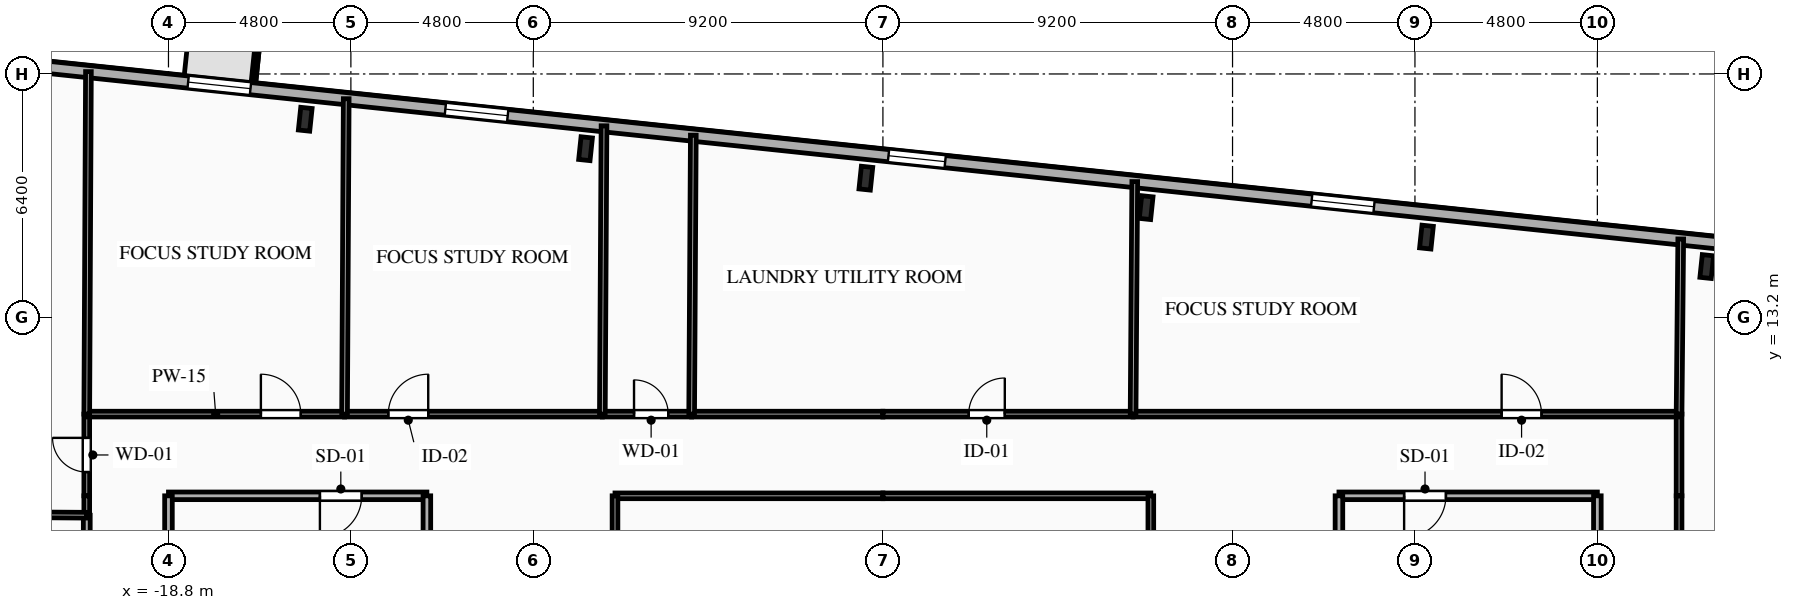
"""IFC4 building model, lengths in metres.
Left out: names, types, materials, properties, quantities, classifications, styles, units other than length and angle.
Written with IfcOpenShell. Run it as: python <this file> out.ifc"""

import sys

from ifc_helpers import new_model, si_unit, direction, frame, frame_2d, origin, origin_2d, place, context, subcontext, project, spatial, rectangle, i_section, extrude, element, fill, save


model = new_model("IFC4")
c1 = context("Model", 3, precision=1e-05, world=origin(), true_north=direction((0.0, 1.0)))
c2 = subcontext(c1, "Body", "Model", "MODEL_VIEW")
j1 = project(units=[si_unit("LENGTHUNIT", "METRE"), si_unit("PLANEANGLEUNIT", "RADIAN")], contexts=[c1])
p1 = place(None, origin())
s1 = spatial("IfcSite", under=j1, at=p1, CompositionType="ELEMENT")
p2 = place(p1, origin())
s2 = spatial("IfcBuilding", under=s1, at=p2, CompositionType="ELEMENT")
p3 = place(p2, frame((0.0, 0.0, 213.15)))
s3 = spatial("IfcBuildingStorey", under=s2, at=p3, CompositionType="ELEMENT", Elevation=213.15)
for number, where, z_axis, x_axis in (
    (1, (21.679, 14.532, 0.0), (0.0, 0.0, 1.0), (0.995, -0.105, 0.0)),
    (2, (14.303, 15.308, 0.0), (0.0, 0.0, 1.0), (0.995, -0.105, 0.0)),
    (3, (6.927, 16.083, 0.0), (0.0, 0.0, 1.0), (0.995, -0.105, 0.0)),
    (4, (-0.449, 16.858, 0.0), (0.0, 0.0, 1.0), (0.995, -0.105, 0.0)),
    (5, (-7.825, 17.634, 0.0), (0.0, 0.0, 1.0), (0.995, -0.105, 0.0)),
    (6, (-15.201, 18.409, 0.0), (0.0, 0.0, 1.0), (0.995, -0.105, 0.0)),
):
    element("IfcColumn", number, at=place(p3, frame(where, z_axis=z_axis, x_axis=x_axis)), inside=s3, PredefinedType="COLUMN", context=c2, shape_type="SweptSolid", body=[
        extrude(i_section(OverallWidth=0.3, OverallDepth=0.6, WebThickness=0.015, FlangeThickness=0.03, FilletRadius=0.027, at=origin_2d()), origin(), (0.0, 0.0, 1.0), 3.35),
    ])
p4 = place(p3, frame((-23.156, 19.898, 0.0), z_axis=(0.0, 0.0, 1.0), x_axis=(0.994522001802, -0.104527450613, 0.0)))
e7 = element("IfcWall", 7, at=p4, inside=s3, PredefinedType="SOLIDWALL", context=c2, shape_type="SweptSolid", body=[
    extrude(rectangle(XDim=45.8, YDim=0.32, at=frame_2d((22.9, 0.0))), origin(), (0.0, 0.0, 1.0), 3.04),
])
p5 = place(p4, frame((4.9, 0.0, 0.85)))
e8 = element("IfcOpeningElement", 8, at=p5, cuts=e7, PredefinedType="OPENING", context=c2, shape_type="SweptSolid", body=[
    extrude(rectangle(XDim=1.65, YDim=1.85, at=frame_2d((0.825, 0.925))), frame((0.0, 0.17, 0.0), z_axis=(0.0, -1.0, 0.0), x_axis=(1.0, 0.0, 0.0)), (0.0, 0.0, 1.0), 0.34),
])
p6 = place(p4, frame((11.706, 0.0, 0.85)))
e9 = element("IfcOpeningElement", 9, at=p6, cuts=e7, PredefinedType="OPENING", context=c2, shape_type="SweptSolid", body=[
    extrude(rectangle(XDim=1.65, YDim=1.85, at=frame_2d((0.825, 0.925))), frame((0.0, 0.17, 0.0), z_axis=(0.0, -1.0, 0.0), x_axis=(1.0, 0.0, 0.0)), (0.0, 0.0, 1.0), 0.34),
])
p7 = place(p4, frame((23.431, 0.0, 0.85)))
e10 = element("IfcOpeningElement", 10, at=p7, cuts=e7, PredefinedType="OPENING", context=c2, shape_type="SweptSolid", body=[
    extrude(rectangle(XDim=1.5, YDim=1.85, at=frame_2d((0.75, 0.925))), frame((0.0, 0.17, 0.0), z_axis=(0.0, -1.0, 0.0), x_axis=(1.0, 0.0, 0.0)), (0.0, 0.0, 1.0), 0.34),
])
p8 = place(p4, frame((34.628, 0.0, 0.85)))
e11 = element("IfcOpeningElement", 11, at=p8, cuts=e7, PredefinedType="OPENING", context=c2, shape_type="SweptSolid", body=[
    extrude(rectangle(XDim=1.65, YDim=1.85, at=frame_2d((0.825, 0.925))), frame((0.0, 0.17, 0.0), z_axis=(0.0, -1.0, 0.0), x_axis=(1.0, 0.0, 0.0)), (0.0, 0.0, 1.0), 0.34),
])
p9 = place(p3, frame((-12.0, 8.5, 0.0), z_axis=(0.0, 0.0, 1.0), x_axis=(-1.0, 0.0, 0.0)))
e12 = element("IfcWall", 12, at=p9, inside=s3, PredefinedType="PARTITIONING", context=c2, shape_type="SweptSolid", body=[
    extrude(rectangle(XDim=6.8, YDim=0.2, at=frame_2d((3.4, 0.0))), origin(), (0.0, 0.0, 1.0), 3.04),
])
p10 = place(p9, frame((1.715, 0.0, 0.0)))
e13 = element("IfcOpeningElement", 13, at=p10, cuts=e12, PredefinedType="OPENING", context=c2, shape_type="SweptSolid", body=[
    extrude(rectangle(XDim=1.1, YDim=2.15, at=frame_2d((0.55, 1.075))), frame((0.0, 0.11, 0.0), z_axis=(0.0, -1.0, 0.0), x_axis=(1.0, 0.0, 0.0)), (0.0, 0.0, 1.0), 0.22),
])
p11 = place(p3, frame((-18.8, 8.5, 0.0), z_axis=(0.0, 0.0, 1.0), x_axis=(0.0, -1.0, 0.0)))
e14 = element("IfcWall", 14, at=p11, inside=s3, PredefinedType="PARTITIONING", context=c2, shape_type="SweptSolid", body=[
    extrude(rectangle(XDim=2.9, YDim=0.2, at=frame_2d((1.45, 0.0))), origin(), (0.0, 0.0, 1.0), 2.665),
])
p12 = place(p3, frame((-12.0, 5.6, 0.0), z_axis=(0.0, 0.0, 1.0), x_axis=(0.0, 1.0, 0.0)))
e15 = element("IfcWall", 15, at=p12, inside=s3, PredefinedType="PARTITIONING", context=c2, shape_type="SweptSolid", body=[
    extrude(rectangle(XDim=2.9, YDim=0.2, at=frame_2d((1.45, 0.0))), origin(), (0.0, 0.0, 1.0), 3.04),
])
p13 = place(p3, frame((18.8, 8.5, 0.0), z_axis=(0.0, 0.0, 1.0), x_axis=(-1.0, 0.0, 0.0)))
e16 = element("IfcWall", 16, at=p13, inside=s3, PredefinedType="PARTITIONING", context=c2, shape_type="SweptSolid", body=[
    extrude(rectangle(XDim=6.8, YDim=0.2, at=frame_2d((3.4, 0.0))), origin(), (0.0, 0.0, 1.0), 3.04),
])
p14 = place(p13, frame((3.985, 0.0, 0.0)))
e17 = element("IfcOpeningElement", 17, at=p14, cuts=e16, PredefinedType="OPENING", context=c2, shape_type="SweptSolid", body=[
    extrude(rectangle(XDim=1.1, YDim=2.15, at=frame_2d((0.55, 1.075))), frame((0.0, 0.11, 0.0), z_axis=(0.0, -1.0, 0.0), x_axis=(1.0, 0.0, 0.0)), (0.0, 0.0, 1.0), 0.22),
])
p15 = place(p3, frame((18.8, 5.6, 0.0), z_axis=(0.0, 0.0, 1.0), x_axis=(0.0, 1.0, 0.0)))
e18 = element("IfcWall", 18, at=p15, inside=s3, PredefinedType="PARTITIONING", context=c2, shape_type="SweptSolid", body=[
    extrude(rectangle(XDim=2.9, YDim=0.2, at=frame_2d((1.45, 0.0))), origin(), (0.0, 0.0, 1.0), 2.665),
])
p16 = place(p3, frame((12.0, 8.5, 0.0), z_axis=(0.0, 0.0, 1.0), x_axis=(0.0, -1.0, 0.0)))
e19 = element("IfcWall", 19, at=p16, inside=s3, PredefinedType="PARTITIONING", context=c2, shape_type="SweptSolid", body=[
    extrude(rectangle(XDim=2.9, YDim=0.2, at=frame_2d((1.45, 0.0))), origin(), (0.0, 0.0, 1.0), 3.04),
])
p17 = place(p3, frame((-20.95, 8.5, 0.0), z_axis=(0.0, 0.0, 1.0), x_axis=(0.0, 1.0, 0.0)))
e20 = element("IfcWall", 20, at=p17, inside=s3, PredefinedType="PARTITIONING", context=c2, shape_type="SweptSolid", body=[
    extrude(rectangle(XDim=2.15, YDim=0.15, at=frame_2d((1.075, 0.0))), origin(), (0.0, 0.0, 1.0), 3.04),
])
p18 = place(p17, frame((0.625, 0.0, 0.0)))
e21 = element("IfcOpeningElement", 21, at=p18, cuts=e20, PredefinedType="OPENING", context=c2, shape_type="SweptSolid", body=[
    extrude(rectangle(XDim=0.9, YDim=2.1, at=frame_2d((0.45, 1.05))), frame((0.0, 0.085, 0.0), z_axis=(0.0, -1.0, 0.0), x_axis=(1.0, 0.0, 0.0)), (0.0, 0.0, 1.0), 0.17),
])
p19 = place(p3, frame((-20.95, 10.65, 0.0), z_axis=(0.0, 0.0, 1.0), x_axis=(1.0, 0.0, 0.0)))
e22 = element("IfcWall", 22, at=p19, inside=s3, PredefinedType="PARTITIONING", context=c2, shape_type="SweptSolid", body=[
    extrude(rectangle(XDim=6.783, YDim=0.15, at=frame_2d((3.392, 0.0))), origin(), (0.0, 0.0, 1.0), 3.04),
])
p20 = place(p19, frame((4.582, 0.0, 0.0)))
e23 = element("IfcOpeningElement", 23, at=p20, cuts=e22, PredefinedType="OPENING", context=c2, shape_type="SweptSolid", body=[
    extrude(rectangle(XDim=1.05, YDim=2.15, at=frame_2d((0.525, 1.075))), frame((0.0, 0.085, 0.0), z_axis=(0.0, -1.0, 0.0), x_axis=(1.0, 0.0, 0.0)), (0.0, 0.0, 1.0), 0.17),
])
p21 = place(p3, frame((-14.167, 10.65, 0.0), z_axis=(0.0, 0.0, 1.0), x_axis=(1.0, 0.0, 0.0)))
e24 = element("IfcWall", 24, at=p21, inside=s3, PredefinedType="PARTITIONING", context=c2, shape_type="SweptSolid", body=[
    extrude(rectangle(XDim=6.783, YDim=0.15, at=frame_2d((3.392, 0.0))), origin(), (0.0, 0.0, 1.0), 3.04),
])
p22 = place(p21, frame((1.152, 0.0, 0.0)))
e25 = element("IfcOpeningElement", 25, at=p22, cuts=e24, PredefinedType="OPENING", context=c2, shape_type="SweptSolid", body=[
    extrude(rectangle(XDim=1.05, YDim=2.15, at=frame_2d((0.525, 1.075))), frame((0.0, 0.085, 0.0), z_axis=(0.0, -1.0, 0.0), x_axis=(1.0, 0.0, 0.0)), (0.0, 0.0, 1.0), 0.17),
])
p23 = place(p3, frame((-7.383, 10.65, 0.0), z_axis=(0.0, 0.0, 1.0), x_axis=(1.0, 0.0, 0.0)))
e26 = element("IfcWall", 26, at=p23, inside=s3, PredefinedType="PLUMBINGWALL", context=c2, shape_type="SweptSolid", body=[
    extrude(rectangle(XDim=2.35, YDim=0.15, at=frame_2d((1.175, 0.0))), origin(), (0.0, 0.0, 1.0), 3.04),
])
p24 = place(p23, frame((0.834, 0.0, 0.0)))
e27 = element("IfcOpeningElement", 27, at=p24, cuts=e26, PredefinedType="OPENING", context=c2, shape_type="SweptSolid", body=[
    extrude(rectangle(XDim=0.9, YDim=2.1, at=frame_2d((0.45, 1.05))), frame((0.0, 0.085, 0.0), z_axis=(0.0, -1.0, 0.0), x_axis=(1.0, 0.0, 0.0)), (0.0, 0.0, 1.0), 0.17),
])
p25 = place(p3, frame((-5.033, 10.65, 0.0), z_axis=(0.0, 0.0, 1.0), x_axis=(1.0, 0.0, 0.0)))
e28 = element("IfcWall", 28, at=p25, inside=s3, PredefinedType="PARTITIONING", context=c2, shape_type="SweptSolid", body=[
    extrude(rectangle(XDim=5.033, YDim=0.15, at=frame_2d((2.517, 0.0))), origin(), (0.0, 0.0, 1.0), 3.04),
])
p26 = place(p3, frame((0.0, 8.5, 0.0), z_axis=(0.0, 0.0, 1.0), x_axis=(-1.0, 0.0, 0.0)))
e29 = element("IfcWall", 29, at=p26, inside=s3, PredefinedType="PARTITIONING", context=c2, shape_type="SweptSolid", body=[
    extrude(rectangle(XDim=7.05, YDim=0.15, at=frame_2d((3.525, 0.0))), origin(), (0.0, 0.0, 1.0), 3.04),
])
p27 = place(p3, frame((20.95, 10.65, 0.0), z_axis=(0.0, 0.0, 1.0), x_axis=(0.0, -1.0, 0.0)))
e30 = element("IfcWall", 30, at=p27, inside=s3, PredefinedType="PARTITIONING", context=c2, shape_type="SweptSolid", body=[
    extrude(rectangle(XDim=2.15, YDim=0.15, at=frame_2d((1.075, 0.0))), origin(), (0.0, 0.0, 1.0), 3.04),
])
p28 = place(p3, frame((0.0, 10.65, 0.0), z_axis=(0.0, 0.0, 1.0), x_axis=(1.0, 0.0, 0.0)))
e31 = element("IfcWall", 31, at=p28, inside=s3, PredefinedType="PARTITIONING", context=c2, shape_type="SweptSolid", body=[
    extrude(rectangle(XDim=6.583, YDim=0.15, at=frame_2d((3.292, 0.0))), origin(), (0.0, 0.0, 1.0), 3.04),
])
p29 = place(p28, frame((2.257, 0.0, 0.0)))
e32 = element("IfcOpeningElement", 32, at=p29, cuts=e31, PredefinedType="OPENING", context=c2, shape_type="SweptSolid", body=[
    extrude(rectangle(XDim=0.95, YDim=2.1, at=frame_2d((0.475, 1.05))), frame((0.0, 0.085, 0.0), z_axis=(0.0, -1.0, 0.0), x_axis=(1.0, 0.0, 0.0)), (0.0, 0.0, 1.0), 0.17),
])
p30 = place(p3, frame((6.583, 10.65, 0.0), z_axis=(0.0, 0.0, 1.0), x_axis=(1.0, 0.0, 0.0)))
e33 = element("IfcWall", 33, at=p30, inside=s3, PredefinedType="PARTITIONING", context=c2, shape_type="SweptSolid", body=[
    extrude(rectangle(XDim=14.367, YDim=0.15, at=frame_2d((7.184, 0.0))), origin(), (0.0, 0.0, 1.0), 3.04),
])
p31 = place(p30, frame((9.698, 0.0, 0.0)))
e34 = element("IfcOpeningElement", 34, at=p31, cuts=e33, PredefinedType="OPENING", context=c2, shape_type="SweptSolid", body=[
    extrude(rectangle(XDim=1.05, YDim=2.15, at=frame_2d((0.525, 1.075))), frame((0.0, 0.085, 0.0), z_axis=(0.0, -1.0, 0.0), x_axis=(1.0, 0.0, 0.0)), (0.0, 0.0, 1.0), 0.17),
])
p32 = place(p3, frame((7.05, 8.5, 0.0), z_axis=(0.0, 0.0, 1.0), x_axis=(-1.0, 0.0, 0.0)))
e35 = element("IfcWall", 35, at=p32, inside=s3, PredefinedType="PARTITIONING", context=c2, shape_type="SweptSolid", body=[
    extrude(rectangle(XDim=7.05, YDim=0.15, at=frame_2d((3.525, 0.0))), origin(), (0.0, 0.0, 1.0), 3.04),
])
p33 = place(p3, frame((-20.95, -1.306, 0.0), z_axis=(0.0, 0.0, 1.0), x_axis=(0.0, 1.0, 0.0)))
e36 = element("IfcWall", 36, at=p33, inside=s3, PredefinedType="PARTITIONING", context=c2, shape_type="SweptSolid", body=[
    extrude(rectangle(XDim=9.296, YDim=0.18, at=frame_2d((4.648, 0.0))), origin(), (0.0, 0.0, 1.0), 3.04),
])
p34 = place(p33, frame((1.472, 0.0, 0.0)))
e37 = element("IfcOpeningElement", 37, at=p34, cuts=e36, PredefinedType="OPENING", context=c2, shape_type="SweptSolid", body=[
    extrude(rectangle(XDim=1.0, YDim=2.15, at=frame_2d((0.5, 1.075))), frame((0.0, 0.1, 0.0), z_axis=(0.0, -1.0, 0.0), x_axis=(1.0, 0.0, 0.0)), (0.0, 0.0, 1.0), 0.2),
])
p35 = place(p3, frame((-20.95, 7.99, 0.0), z_axis=(0.0, 0.0, 1.0), x_axis=(0.0, 1.0, 0.0)))
e38 = element("IfcWall", 38, at=p35, inside=s3, PredefinedType="PARTITIONING", context=c2, shape_type="SweptSolid", body=[
    extrude(rectangle(XDim=0.51, YDim=0.15, at=frame_2d((0.255, 0.0))), origin(), (0.0, 0.0, 1.0), 3.04),
])
p36 = place(p3, frame((20.95, 8.5, 0.0), z_axis=(0.0, 0.0, 1.0), x_axis=(0.0, -1.0, 0.0)))
e39 = element("IfcWall", 39, at=p36, inside=s3, PredefinedType="PARTITIONING", context=c2, shape_type="SweptSolid", body=[
    extrude(rectangle(XDim=9.263, YDim=0.15, at=frame_2d((4.632, 0.0))), origin(), (0.0, 0.0, 1.0), 2.695),
])
p37 = place(p36, frame((6.751, 0.0, 0.0)))
e40 = element("IfcOpeningElement", 40, at=p37, cuts=e39, PredefinedType="OPENING", context=c2, shape_type="SweptSolid", body=[
    extrude(rectangle(XDim=1.05, YDim=2.15, at=frame_2d((0.525, 1.075))), frame((0.0, 0.085, 0.0), z_axis=(0.0, -1.0, 0.0), x_axis=(1.0, 0.0, 0.0)), (0.0, 0.0, 1.0), 0.17),
])
for number, where, z_axis, x_axis in (
    (41, (-7.05, 8.5, 0.0), (0.0, 0.0, 1.0), (0.0, -1.0, 0.0)),
    (42, (7.05, -0.8, 0.0), (0.0, 0.0, 1.0), (0.0, 1.0, 0.0)),
):
    element("IfcWall", number, at=place(p3, frame(where, z_axis=z_axis, x_axis=x_axis)), inside=s3, PredefinedType="PARTITIONING", context=c2, shape_type="SweptSolid", body=[
        extrude(rectangle(XDim=9.3, YDim=0.15, at=frame_2d((4.65, 0.0))), origin(), (0.0, 0.0, 1.0), 3.04),
    ])
p38 = place(p3, frame((-27.419, 8.034, 0.0), z_axis=(0.0, 0.0, 1.0), x_axis=(0.999976928608, -0.006792808784, 0.0)))
e43 = element("IfcWall", 43, at=p38, inside=s3, PredefinedType="PARTITIONING", context=c2, shape_type="SweptSolid", body=[
    extrude(rectangle(XDim=6.469, YDim=0.15, at=frame_2d((3.235, 0.0))), origin(), (0.0, 0.0, 1.0), 3.04),
])
p39 = place(p3, frame((-20.906, 19.662, 0.0), z_axis=(0.0, 0.0, 1.0), x_axis=(-0.004876272857, -0.999988110911, 0.0)))
e44 = element("IfcWall", 44, at=p39, inside=s3, PredefinedType="PARTITIONING", context=c2, shape_type="SweptSolid", body=[
    extrude(rectangle(XDim=9.012, YDim=0.15, at=frame_2d((4.506, 0.0))), origin(), (0.0, 0.0, 1.0), 2.665),
])
p40 = place(p3, frame((20.95, 10.65, 0.0), z_axis=(0.0, 0.0, 1.0), x_axis=(0.009535990233, 0.999954531411, 0.0)))
e45 = element("IfcWall", 45, at=p40, inside=s3, PredefinedType="PARTITIONING", context=c2, shape_type="SweptSolid", body=[
    extrude(rectangle(XDim=4.608, YDim=0.15, at=frame_2d((2.304, 0.0))), origin(), (0.0, 0.0, 1.0), 2.665),
])
p41 = place(p3, frame((-14.123, 18.949, 0.0), z_axis=(0.0, 0.0, 1.0), x_axis=(-0.005295133602, -0.999985980682, 0.0)))
e46 = element("IfcWall", 46, at=p41, inside=s3, PredefinedType="PARTITIONING", context=c2, shape_type="SweptSolid", body=[
    extrude(rectangle(XDim=8.299, YDim=0.15, at=frame_2d((4.149, 0.0))), origin(), (0.0, 0.0, 1.0), 3.04),
])
p42 = place(p3, frame((-7.339, 18.236, 0.0), z_axis=(0.0, 0.0, 1.0), x_axis=(-0.005792713287, -0.999983222096, 0.0)))
e47 = element("IfcWall", 47, at=p42, inside=s3, PredefinedType="PLUMBINGWALL", context=c2, shape_type="SweptSolid", body=[
    extrude(rectangle(XDim=7.586, YDim=0.15, at=frame_2d((3.793, 0.0))), origin(), (0.0, 0.0, 1.0), 3.04),
])
p43 = place(p3, frame((-4.989, 17.989, 0.0), z_axis=(0.0, 0.0, 1.0), x_axis=(-0.005987717415, -0.999982073459, 0.0)))
e48 = element("IfcWall", 48, at=p43, inside=s3, PredefinedType="PLUMBINGWALL", context=c2, shape_type="SweptSolid", body=[
    extrude(rectangle(XDim=7.339, YDim=0.15, at=frame_2d((3.67, 0.0))), origin(), (0.0, 0.0, 1.0), 3.04),
])
p44 = place(p3, frame((6.627, 16.768, 0.0), z_axis=(0.0, 0.0, 1.0), x_axis=(-0.007182576093, -0.999974204968, 0.0)))
e49 = element("IfcWall", 49, at=p44, inside=s3, PredefinedType="PARTITIONING", context=c2, shape_type="SweptSolid", body=[
    extrude(rectangle(XDim=6.118, YDim=0.15, at=frame_2d((3.059, 0.0))), origin(), (0.0, 0.0, 1.0), 3.04),
])
p45 = place(p5, origin())
e50 = element("IfcWindow", 50, at=p45, inside=s3, PartitioningType="SINGLE_PANEL", PredefinedType="WINDOW", context=c2, shape_type="SweptSolid", body=[
    extrude(rectangle(XDim=1.65, YDim=1.85, at=frame_2d((0.825, 0.925))), frame((0.0, 0.03, 0.0), z_axis=(0.0, -1.0, 0.0), x_axis=(1.0, 0.0, 0.0)), (0.0, 0.0, 1.0), 0.06),
])
fill(e8, e50)
p46 = place(p6, origin())
e51 = element("IfcWindow", 51, at=p46, inside=s3, PartitioningType="SINGLE_PANEL", PredefinedType="WINDOW", context=c2, shape_type="SweptSolid", body=[
    extrude(rectangle(XDim=1.65, YDim=1.85, at=frame_2d((0.825, 0.925))), frame((0.0, 0.03, 0.0), z_axis=(0.0, -1.0, 0.0), x_axis=(1.0, 0.0, 0.0)), (0.0, 0.0, 1.0), 0.06),
])
fill(e9, e51)
p47 = place(p7, origin())
e52 = element("IfcWindow", 52, at=p47, inside=s3, PartitioningType="SINGLE_PANEL", PredefinedType="WINDOW", context=c2, shape_type="SweptSolid", body=[
    extrude(rectangle(XDim=1.5, YDim=1.85, at=frame_2d((0.75, 0.925))), frame((0.0, 0.03, 0.0), z_axis=(0.0, -1.0, 0.0), x_axis=(1.0, 0.0, 0.0)), (0.0, 0.0, 1.0), 0.06),
])
fill(e10, e52)
p48 = place(p8, origin())
e53 = element("IfcWindow", 53, at=p48, inside=s3, PartitioningType="SINGLE_PANEL", PredefinedType="WINDOW", context=c2, shape_type="SweptSolid", body=[
    extrude(rectangle(XDim=1.65, YDim=1.85, at=frame_2d((0.825, 0.925))), frame((0.0, 0.03, 0.0), z_axis=(0.0, -1.0, 0.0), x_axis=(1.0, 0.0, 0.0)), (0.0, 0.0, 1.0), 0.06),
])
fill(e11, e53)
p49 = place(p10, origin())
e54 = element("IfcDoor", 54, at=p49, inside=s3, OperationType="SINGLE_SWING_RIGHT", PredefinedType="DOOR", context=c2, shape_type="SweptSolid", body=[
    extrude(rectangle(XDim=1.1, YDim=2.15, at=frame_2d((0.55, 1.075))), frame((0.0, 0.025, 0.0), z_axis=(0.0, -1.0, 0.0), x_axis=(1.0, 0.0, 0.0)), (0.0, 0.0, 1.0), 0.05),
])
fill(e13, e54)
p50 = place(p14, origin())
e55 = element("IfcDoor", 55, at=p50, inside=s3, OperationType="SINGLE_SWING_RIGHT", PredefinedType="DOOR", context=c2, shape_type="SweptSolid", body=[
    extrude(rectangle(XDim=1.1, YDim=2.15, at=frame_2d((0.55, 1.075))), frame((0.0, 0.025, 0.0), z_axis=(0.0, -1.0, 0.0), x_axis=(1.0, 0.0, 0.0)), (0.0, 0.0, 1.0), 0.05),
])
fill(e17, e55)
p51 = place(p18, origin())
e56 = element("IfcDoor", 56, at=p51, inside=s3, OperationType="SINGLE_SWING_RIGHT", PredefinedType="DOOR", context=c2, shape_type="SweptSolid", body=[
    extrude(rectangle(XDim=0.9, YDim=2.1, at=frame_2d((0.45, 1.05))), frame((0.0, 0.025, 0.0), z_axis=(0.0, -1.0, 0.0), x_axis=(1.0, 0.0, 0.0)), (0.0, 0.0, 1.0), 0.05),
])
fill(e21, e56)
p52 = place(p20, origin())
e57 = element("IfcDoor", 57, at=p52, inside=s3, OperationType="SINGLE_SWING_LEFT", PredefinedType="DOOR", context=c2, shape_type="SweptSolid", body=[
    extrude(rectangle(XDim=1.05, YDim=2.15, at=frame_2d((0.525, 1.075))), frame((0.0, 0.025, 0.0), z_axis=(0.0, -1.0, 0.0), x_axis=(1.0, 0.0, 0.0)), (0.0, 0.0, 1.0), 0.05),
])
fill(e23, e57)
p53 = place(p22, origin())
e58 = element("IfcDoor", 58, at=p53, inside=s3, OperationType="SINGLE_SWING_RIGHT", PredefinedType="DOOR", context=c2, shape_type="SweptSolid", body=[
    extrude(rectangle(XDim=1.05, YDim=2.15, at=frame_2d((0.525, 1.075))), frame((0.0, 0.025, 0.0), z_axis=(0.0, -1.0, 0.0), x_axis=(1.0, 0.0, 0.0)), (0.0, 0.0, 1.0), 0.05),
])
fill(e25, e58)
p54 = place(p24, origin())
e59 = element("IfcDoor", 59, at=p54, inside=s3, OperationType="SINGLE_SWING_LEFT", PredefinedType="DOOR", context=c2, shape_type="SweptSolid", body=[
    extrude(rectangle(XDim=0.9, YDim=2.1, at=frame_2d((0.45, 1.05))), frame((0.0, 0.025, 0.0), z_axis=(0.0, -1.0, 0.0), x_axis=(1.0, 0.0, 0.0)), (0.0, 0.0, 1.0), 0.05),
])
fill(e27, e59)
p55 = place(p29, origin())
e60 = element("IfcDoor", 60, at=p55, inside=s3, OperationType="SINGLE_SWING_RIGHT", PredefinedType="DOOR", context=c2, shape_type="SweptSolid", body=[
    extrude(rectangle(XDim=0.95, YDim=2.1, at=frame_2d((0.475, 1.05))), frame((0.0, 0.025, 0.0), z_axis=(0.0, -1.0, 0.0), x_axis=(1.0, 0.0, 0.0)), (0.0, 0.0, 1.0), 0.05),
])
fill(e32, e60)
p56 = place(p31, origin())
e61 = element("IfcDoor", 61, at=p56, inside=s3, OperationType="SINGLE_SWING_LEFT", PredefinedType="DOOR", context=c2, shape_type="SweptSolid", body=[
    extrude(rectangle(XDim=1.05, YDim=2.15, at=frame_2d((0.525, 1.075))), frame((0.0, 0.025, 0.0), z_axis=(0.0, -1.0, 0.0), x_axis=(1.0, 0.0, 0.0)), (0.0, 0.0, 1.0), 0.05),
])
fill(e34, e61)
save(model, sys.argv[1])
